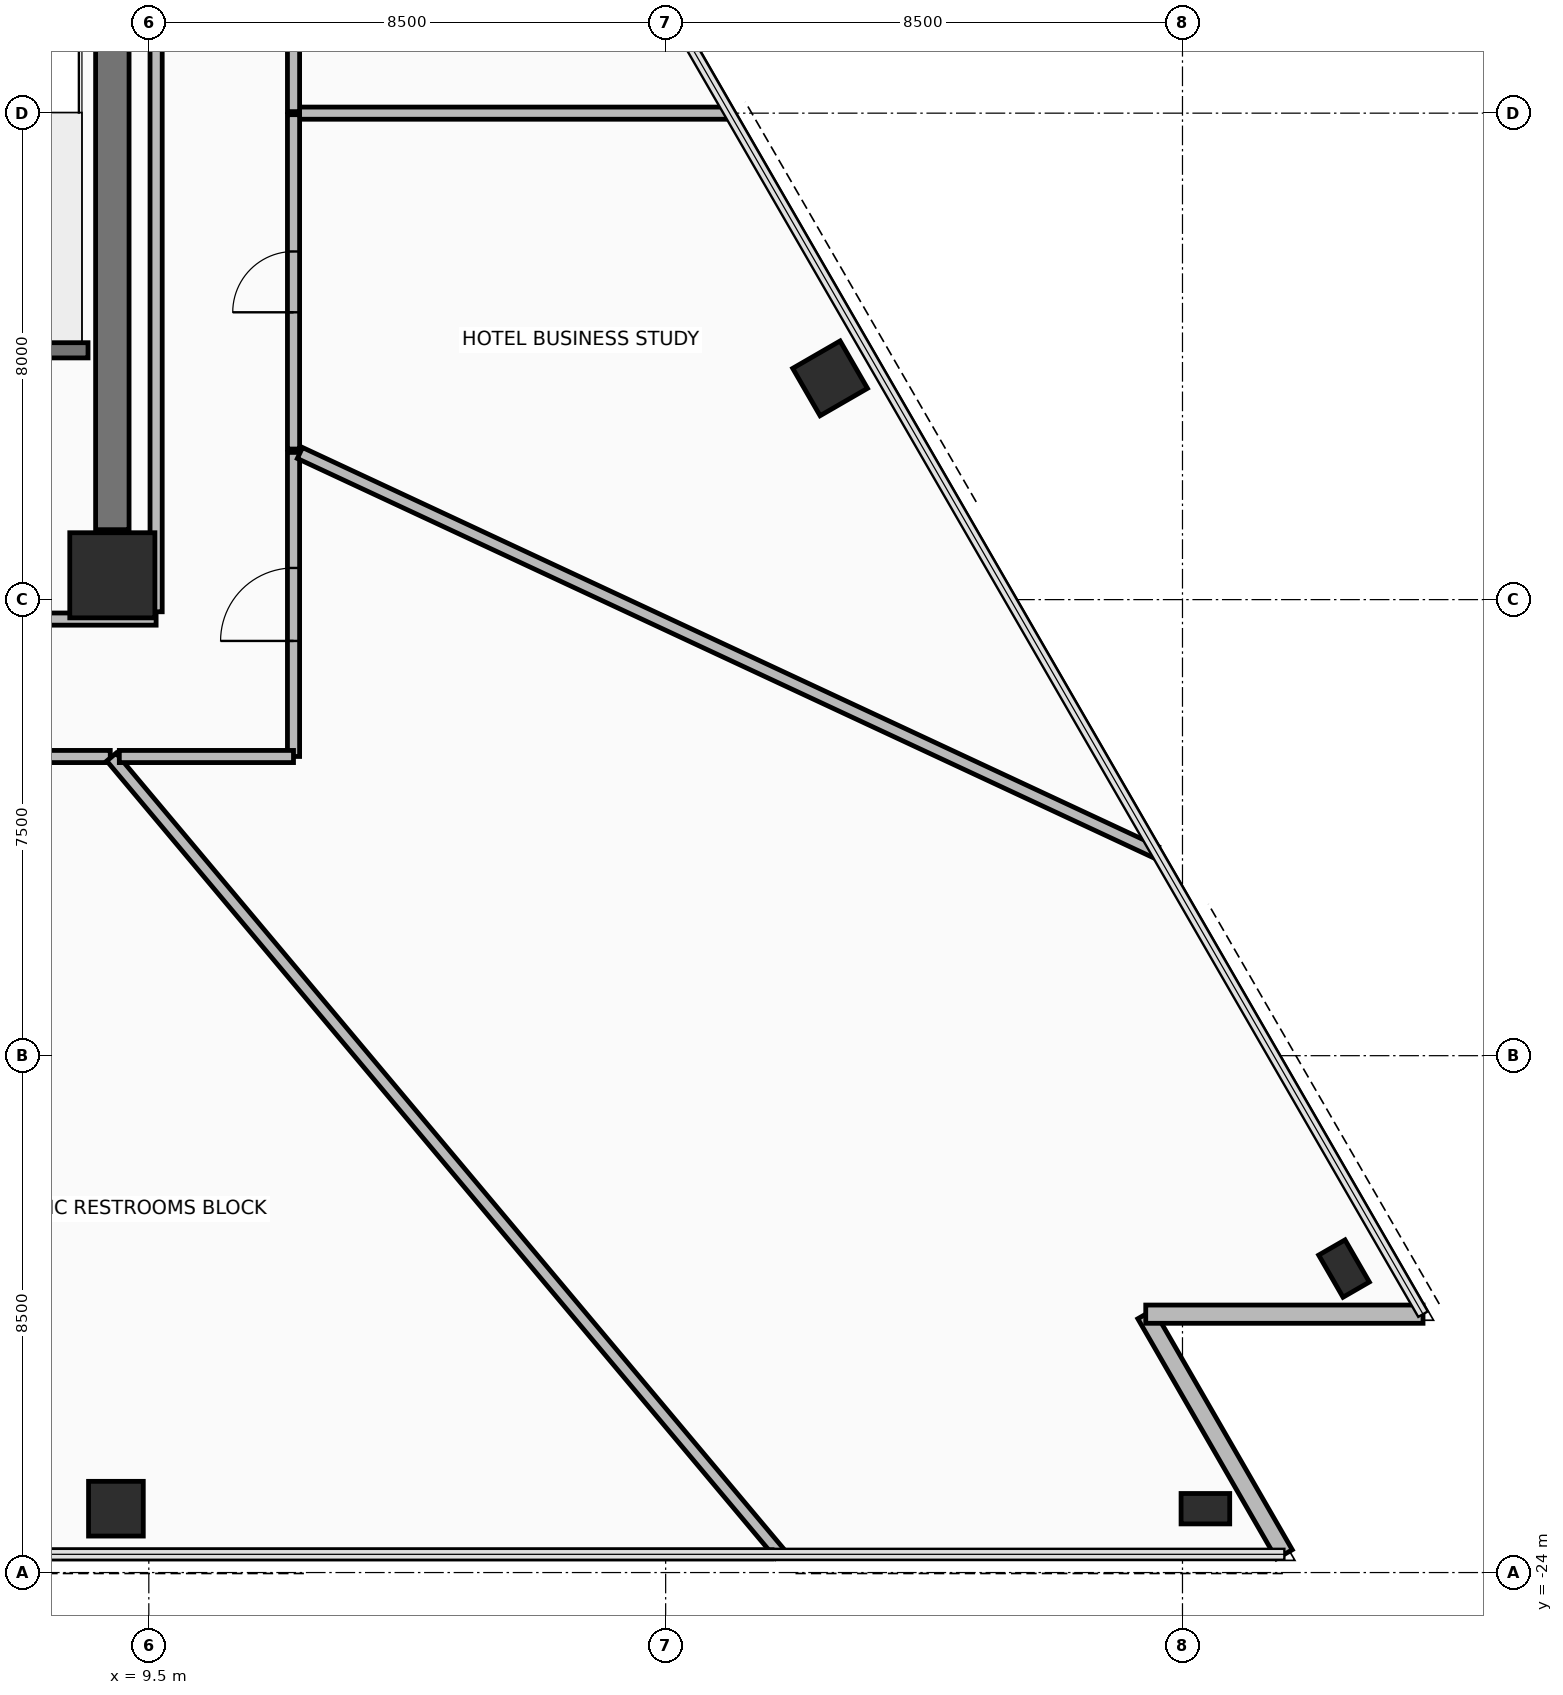
"""IFC4 building model, lengths in metres.
Left out: names, types, materials, properties, quantities, classifications, styles, units other than length and angle.
Written with IfcOpenShell. Run it as: python <this file> out.ifc"""

import sys

from ifc_helpers import new_model, si_unit, direction, frame, frame_2d, origin, origin_2d, place, context, subcontext, project, spatial, rectangle, hollow_rectangle, extrude, element, fill, save


model = new_model("IFC4")
c1 = context("Model", 3, precision=1e-05, world=origin(), true_north=direction((0.0, 1.0)))
c2 = subcontext(c1, "Body", "Model", "MODEL_VIEW")
j1 = project(units=[si_unit("LENGTHUNIT", "METRE"), si_unit("PLANEANGLEUNIT", "RADIAN")], contexts=[c1])
p1 = place(None, origin())
s1 = spatial("IfcSite", under=j1, at=p1, CompositionType="ELEMENT")
p2 = place(p1, origin())
s2 = spatial("IfcBuilding", under=s1, at=p2, CompositionType="ELEMENT")
p3 = place(p2, frame((0.0, 0.0, 42.05)))
s3 = spatial("IfcBuildingStorey", under=s2, at=p3, CompositionType="ELEMENT", Elevation=42.05)
p4 = place(p3, frame((8.9, -7.6, 0.0), z_axis=(0.0, 0.0, 1.0), x_axis=(1.0, 0.0, 0.0)))
e1 = element("IfcColumn", 1, at=p4, inside=s3, PredefinedType="COLUMN", context=c2, shape_type="SweptSolid", body=[
    extrude(rectangle(XDim=1.4, YDim=1.4, at=origin_2d()), origin(), (0.0, 0.0, 1.0), 3.4),
])
p5 = place(p3, frame((8.959, -22.95, 0.0), z_axis=(0.0, 0.0, 1.0), x_axis=(1.0, 0.0, 0.0)))
e2 = element("IfcColumn", 2, at=p5, inside=s3, PredefinedType="COLUMN", context=c2, shape_type="SweptSolid", body=[
    extrude(hollow_rectangle(XDim=0.9, YDim=0.9, WallThickness=0.05, at=origin_2d()), origin(), (0.0, 0.0, 1.0), 3.4),
])
for number, where, z_axis, x_axis in (
    (3, (26.877, -22.95, 0.0), (0.0, 0.0, 1.0), (1.0, 0.0, 0.0)),
    (4, (29.157, -19.001, 0.0), (0.0, 0.0, 1.0), (-0.5, 0.866, 0.0)),
):
    element("IfcColumn", number, at=place(p3, frame(where, z_axis=z_axis, x_axis=x_axis)), inside=s3, PredefinedType="COLUMN", context=c2, shape_type="SweptSolid", body=[
        extrude(hollow_rectangle(XDim=0.5, YDim=0.8, WallThickness=0.04, at=origin_2d()), origin(), (0.0, 0.0, 1.0), 3.4),
    ])
p6 = place(p3, frame((20.705, -4.361, 0.0), z_axis=(0.0, 0.0, 1.0), x_axis=(-0.500001511499, 0.866024531118, 0.0)))
e5 = element("IfcColumn", 5, at=p6, inside=s3, PredefinedType="COLUMN", context=c2, shape_type="SweptSolid", body=[
    extrude(hollow_rectangle(XDim=0.9, YDim=0.9, WallThickness=0.05, at=origin_2d()), origin(), (0.0, 0.0, 1.0), 3.4),
])
p7 = place(p3, frame((28.176, -23.7, 0.0), z_axis=(0.0, 0.0, 1.0), x_axis=(-0.500014431597, 0.866017071537, 0.0)))
e6 = element("IfcWall", 6, at=p7, inside=s3, PredefinedType="STANDARD", context=c2, shape_type="SweptSolid", body=[
    extrude(rectangle(XDim=4.56, YDim=0.3, at=frame_2d((2.28, 0.0))), origin(), (0.0, 0.0, 1.0), 2.42),
])
p8 = place(p3, frame((25.896, -19.751, 0.0), z_axis=(0.0, 0.0, 1.0), x_axis=(1.0, 0.0, 0.0)))
e7 = element("IfcWall", 7, at=p8, inside=s3, PredefinedType="STANDARD", context=c2, shape_type="SweptSolid", body=[
    extrude(rectangle(XDim=4.56, YDim=0.3, at=frame_2d((2.28, 0.0))), origin(), (0.0, 0.0, 1.0), 2.42),
])
p9 = place(p3, frame((8.9, -6.85, 0.0), z_axis=(0.0, 0.0, 1.0), x_axis=(0.0, 1.0, 0.0)))
e8 = element("IfcWall", 8, at=p9, inside=s3, PredefinedType="SHEAR", context=c2, shape_type="SweptSolid", body=[
    extrude(rectangle(XDim=10.7, YDim=0.55, at=frame_2d((5.35, 0.0))), origin(), (0.0, 0.0, 1.0), 3.225),
])
p10 = place(p3, frame((-9.62, -8.32, 0.0), z_axis=(0.0, 0.0, 1.0), x_axis=(1.0, 0.0, 0.0)))
e9 = element("IfcWall", 9, at=p10, inside=s3, PredefinedType="PARTITIONING", context=c2, shape_type="SweptSolid", body=[
    extrude(rectangle(XDim=19.24, YDim=0.2, at=frame_2d((9.62, 0.0))), origin(), (0.0, 0.0, 1.0), 2.62),
])
p11 = place(p10, frame((14.045, 0.0, 0.0)))
e10 = element("IfcOpeningElement", 10, at=p11, cuts=e9, PredefinedType="OPENING", context=c2, shape_type="SweptSolid", body=[
    extrude(rectangle(XDim=0.9, YDim=2.1, at=frame_2d((0.45, 1.05))), frame((0.0, 0.11, 0.0), z_axis=(0.0, -1.0, 0.0), x_axis=(1.0, 0.0, 0.0)), (0.0, 0.0, 1.0), 0.22),
])
p12 = place(p10, frame((15.995, 0.0, 0.0)))
e11 = element("IfcOpeningElement", 11, at=p12, cuts=e9, PredefinedType="OPENING", context=c2, shape_type="SweptSolid", body=[
    extrude(rectangle(XDim=0.9, YDim=2.1, at=frame_2d((0.45, 1.05))), frame((0.0, 0.11, 0.0), z_axis=(0.0, -1.0, 0.0), x_axis=(1.0, 0.0, 0.0)), (0.0, 0.0, 1.0), 0.22),
])
p13 = place(p3, frame((9.62, -8.2, 0.0), z_axis=(0.0, 0.0, 1.0), x_axis=(0.0, 1.0, 0.0)))
e12 = element("IfcWall", 12, at=p13, inside=s3, PredefinedType="PARTITIONING", context=c2, shape_type="SweptSolid", body=[
    extrude(rectangle(XDim=16.4, YDim=0.2, at=frame_2d((8.2, 0.0))), origin(), (0.0, 0.0, 1.0), 2.62),
])
p14 = place(p13, frame((12.65, 0.0, 0.0)))
e13 = element("IfcOpeningElement", 13, at=p14, cuts=e12, PredefinedType="OPENING", context=c2, shape_type="SweptSolid", body=[
    extrude(rectangle(XDim=1.1, YDim=2.15, at=frame_2d((0.55, 1.075))), frame((0.0, 0.11, 0.0), z_axis=(0.0, -1.0, 0.0), x_axis=(1.0, 0.0, 0.0)), (0.0, 0.0, 1.0), 0.22),
])
p15 = place(p3, frame((5.5, -3.9, 0.0), z_axis=(0.0, 0.0, 1.0), x_axis=(1.0, 0.0, 0.0)))
e14 = element("IfcWall", 14, at=p15, inside=s3, PredefinedType="SHEAR", context=c2, shape_type="SweptSolid", body=[
    extrude(rectangle(XDim=3.0, YDim=0.25, at=frame_2d((1.5, 0.0))), origin(), (0.0, 0.0, 1.0), 3.225),
])
p16 = place(p3, frame((2.67, -10.58, 0.0), z_axis=(0.0, 0.0, 1.0), x_axis=(1.0, 0.0, 0.0)))
e15 = element("IfcWall", 15, at=p16, inside=s3, PredefinedType="PARTITIONING", context=c2, shape_type="SweptSolid", body=[
    extrude(rectangle(XDim=6.196, YDim=0.2, at=frame_2d((3.098, 0.0))), origin(), (0.0, 0.0, 1.0), 2.62),
])
p17 = place(p16, frame((2.673, 0.0, 0.0)))
e16 = element("IfcOpeningElement", 16, at=p17, cuts=e15, PredefinedType="OPENING", context=c2, shape_type="SweptSolid", body=[
    extrude(rectangle(XDim=0.85, YDim=2.1, at=frame_2d((0.425, 1.05))), frame((0.0, 0.11, 0.0), z_axis=(0.0, -1.0, 0.0), x_axis=(1.0, 0.0, 0.0)), (0.0, 0.0, 1.0), 0.22),
])
p18 = place(p3, frame((8.885, -10.589, 0.0), z_axis=(0.0, 0.0, 1.0), x_axis=(0.642786207644, -0.76604561957, 0.0)))
e17 = element("IfcWall", 17, at=p18, inside=s3, PredefinedType="PARTITIONING", context=c2, shape_type="SweptSolid", body=[
    extrude(rectangle(XDim=17.115, YDim=0.2, at=frame_2d((8.558, 0.0))), origin(), (0.0, 0.0, 1.0), 2.42),
])
p19 = place(p3, frame((19.75, -23.7, 0.0), z_axis=(0.0, 0.0, 1.0), x_axis=(-1.0, 0.0, 0.0)))
e18 = element("IfcWall", 18, at=p19, inside=s3, PredefinedType="PARTITIONING", context=c2, shape_type="SweptSolid", body=[
    extrude(rectangle(XDim=13.821, YDim=0.15, at=frame_2d((6.91, 0.0))), origin(), (0.0, 0.0, 1.0), 3.225),
])
p20 = place(p3, frame((19.052, 0.0, 0.0), z_axis=(0.0, 0.0, 1.0), x_axis=(-1.0, 0.0, 0.0)))
e19 = element("IfcWall", 19, at=p20, inside=s3, PredefinedType="PARTITIONING", context=c2, shape_type="SweptSolid", body=[
    extrude(rectangle(XDim=7.147, YDim=0.2, at=frame_2d((3.574, 0.0))), origin(), (0.0, 0.0, 1.0), 2.42),
])
p21 = place(p3, frame((11.88, 0.025, 0.0), z_axis=(0.0, 0.0, 1.0), x_axis=(0.0, 1.0, 0.0)))
e20 = element("IfcWall", 20, at=p21, inside=s3, PredefinedType="PARTITIONING", context=c2, shape_type="SweptSolid", body=[
    extrude(rectangle(XDim=4.758, YDim=0.2, at=frame_2d((2.379, 0.0))), origin(), (0.0, 0.0, 1.0), 2.82),
])
p22 = place(p21, frame((1.779, 0.0, 0.0)))
e21 = element("IfcOpeningElement", 21, at=p22, cuts=e20, PredefinedType="OPENING", context=c2, shape_type="SweptSolid", body=[
    extrude(rectangle(XDim=1.2, YDim=2.15, at=frame_2d((0.6, 1.075))), frame((0.0, 0.11, 0.0), z_axis=(0.0, -1.0, 0.0), x_axis=(1.0, 0.0, 0.0)), (0.0, 0.0, 1.0), 0.22),
])
p23 = place(p3, frame((11.88, -10.579, 0.0), z_axis=(0.0, 0.0, 1.0), x_axis=(0.0, 1.0, 0.0)))
e22 = element("IfcWall", 22, at=p23, inside=s3, PredefinedType="PARTITIONING", context=c2, shape_type="SweptSolid", body=[
    extrude(rectangle(XDim=5.0, YDim=0.2, at=frame_2d((2.5, 0.0))), origin(), (0.0, 0.0, 1.0), 2.62),
])
p24 = place(p23, frame((1.9, 0.0, 0.0)))
e23 = element("IfcOpeningElement", 23, at=p24, cuts=e22, PredefinedType="OPENING", context=c2, shape_type="SweptSolid", body=[
    extrude(rectangle(XDim=1.2, YDim=2.15, at=frame_2d((0.6, 1.075))), frame((0.0, 0.11, 0.0), z_axis=(0.0, -1.0, 0.0), x_axis=(1.0, 0.0, 0.0)), (0.0, 0.0, 1.0), 0.22),
])
p25 = place(p3, frame((11.985, -5.589, 0.0), z_axis=(0.0, 0.0, 1.0), x_axis=(0.906307562188, -0.422618743929, 0.0)))
e24 = element("IfcWall", 24, at=p25, inside=s3, PredefinedType="PARTITIONING", context=c2, shape_type="SweptSolid", body=[
    extrude(rectangle(XDim=15.535, YDim=0.2, at=frame_2d((7.768, 0.0))), origin(), (0.0, 0.0, 1.0), 2.42),
])
p26 = place(p3, frame((9.015, -10.58, 0.0), z_axis=(0.0, 0.0, 1.0), x_axis=(1.0, 0.0, 0.0)))
e25 = element("IfcWall", 25, at=p26, inside=s3, PredefinedType="PARTITIONING", context=c2, shape_type="SweptSolid", body=[
    extrude(rectangle(XDim=2.865, YDim=0.2, at=frame_2d((1.432, 0.0))), origin(), (0.0, 0.0, 1.0), 2.62),
])
p27 = place(p3, frame((11.88, -5.524, 0.0), z_axis=(0.0, 0.0, 1.0), x_axis=(0.0, 1.0, 0.0)))
e26 = element("IfcWall", 26, at=p27, inside=s3, PredefinedType="PARTITIONING", context=c2, shape_type="SweptSolid", body=[
    extrude(rectangle(XDim=5.499, YDim=0.2, at=frame_2d((2.75, 0.0))), origin(), (0.0, 0.0, 1.0), 3.225),
])
p28 = place(p27, frame((2.249, 0.0, 0.0)))
e27 = element("IfcOpeningElement", 27, at=p28, cuts=e26, PredefinedType="OPENING", context=c2, shape_type="SweptSolid", body=[
    extrude(rectangle(XDim=1.0, YDim=2.15, at=frame_2d((0.5, 1.075))), frame((0.0, 0.11, 0.0), z_axis=(0.0, -1.0, 0.0), x_axis=(1.0, 0.0, 0.0)), (0.0, 0.0, 1.0), 0.22),
])
p29 = place(p24, origin())
e28 = element("IfcDoor", 28, at=p29, inside=s3, OperationType="SINGLE_SWING_LEFT", PredefinedType="DOOR", context=c2, shape_type="SweptSolid", body=[
    extrude(rectangle(XDim=1.2, YDim=2.15, at=frame_2d((0.6, 1.075))), frame((0.0, 0.025, 0.0), z_axis=(0.0, -1.0, 0.0), x_axis=(1.0, 0.0, 0.0)), (0.0, 0.0, 1.0), 0.05),
])
fill(e23, e28)
p30 = place(p28, origin())
e29 = element("IfcDoor", 29, at=p30, inside=s3, OperationType="SINGLE_SWING_RIGHT", PredefinedType="DOOR", context=c2, shape_type="SweptSolid", body=[
    extrude(rectangle(XDim=1.0, YDim=2.15, at=frame_2d((0.5, 1.075))), frame((0.0, 0.025, 0.0), z_axis=(0.0, -1.0, 0.0), x_axis=(1.0, 0.0, 0.0)), (0.0, 0.0, 1.0), 0.05),
])
fill(e27, e29)
save(model, sys.argv[1])
